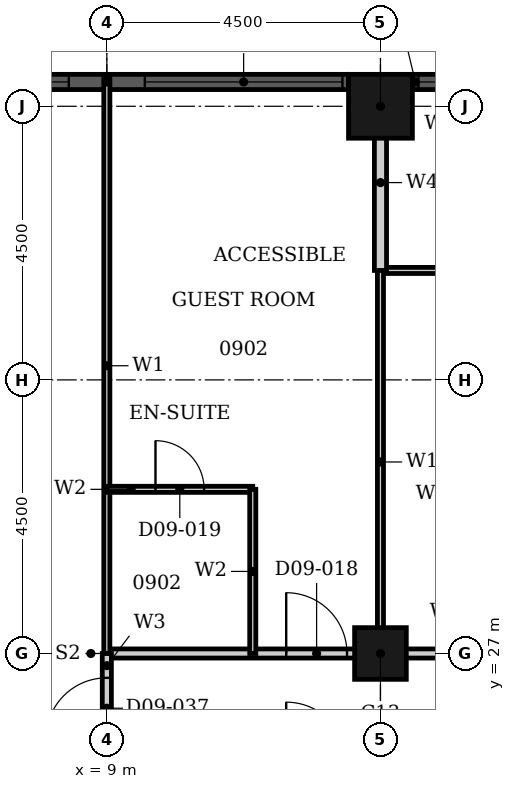
"""IFC4 building model, lengths in metres.
Left out: names, types, materials, properties, quantities, classifications, styles, units other than length and angle.
Written with IfcOpenShell. Run it as: python <this file> out.ifc"""

import sys

from ifc_helpers import new_model, si_unit, direction, frame, frame_2d, origin, origin_2d, place, context, subcontext, project, spatial, rectangle, hollow_rectangle, extrude, element, fill, save


model = new_model("IFC4")
c1 = context("Model", 3, precision=1e-05, world=origin(), true_north=direction((0.0, 1.0)))
c2 = subcontext(c1, "Body", "Model", "MODEL_VIEW")
j1 = project(units=[si_unit("LENGTHUNIT", "METRE"), si_unit("PLANEANGLEUNIT", "RADIAN")], contexts=[c1])
p1 = place(None, origin())
s1 = spatial("IfcSite", under=j1, at=p1, CompositionType="ELEMENT")
p2 = place(p1, origin())
s2 = spatial("IfcBuilding", under=s1, at=p2, CompositionType="ELEMENT")
p3 = place(p2, frame((0.0, 0.0, 44.4)))
s3 = spatial("IfcBuildingStorey", under=s2, at=p3, CompositionType="ELEMENT", Elevation=44.4)
p4 = place(p3, frame((13.5, 36.0, 0.0), z_axis=(0.0, 0.0, 1.0), x_axis=(1.0, 0.0, 0.0)))
e1 = element("IfcColumn", 1, at=p4, inside=s3, PredefinedType="COLUMN", context=c2, shape_type="SweptSolid", body=[
    extrude(hollow_rectangle(XDim=1.05, YDim=1.05, WallThickness=0.034, at=origin_2d()), origin(), (0.0, 0.0, 1.0), 3.6),
])
p5 = place(p3, frame((13.5, 27.0, 0.0), z_axis=(0.0, 0.0, 1.0), x_axis=(1.0, 0.0, 0.0)))
e2 = element("IfcColumn", 2, at=p5, inside=s3, PredefinedType="COLUMN", context=c2, shape_type="SweptSolid", body=[
    extrude(hollow_rectangle(XDim=0.85, YDim=0.85, WallThickness=0.026, at=origin_2d()), origin(), (0.0, 0.0, 1.0), 3.6),
])
p6 = place(p3, frame((15.225, 36.4, 0.0), z_axis=(0.0, 0.0, 1.0), x_axis=(-1.0, 0.0, 0.0)))
e3 = element("IfcWall", 3, at=p6, inside=s3, PredefinedType="SOLIDWALL", context=c2, shape_type="SweptSolid", body=[
    extrude(rectangle(XDim=1.2, YDim=0.25, at=frame_2d((0.6, 0.0))), origin(), (0.0, 0.0, 1.0), 3.6),
])
p7 = place(p6, frame((0.1, 0.0, 0.9)))
e4 = element("IfcOpeningElement", 4, at=p7, cuts=e3, PredefinedType="OPENING", context=c2, shape_type="SweptSolid", body=[
    extrude(rectangle(XDim=1.0, YDim=2.08, at=frame_2d((0.5, 1.04))), frame((0.0, 0.135, 0.0), z_axis=(0.0, -1.0, 0.0), x_axis=(1.0, 0.0, 0.0)), (0.0, 0.0, 1.0), 0.27),
])
p8 = place(p3, frame((12.975, 36.4, 0.0), z_axis=(0.0, 0.0, 1.0), x_axis=(-1.0, 0.0, 0.0)))
e5 = element("IfcWall", 5, at=p8, inside=s3, PredefinedType="SOLIDWALL", context=c2, shape_type="SweptSolid", body=[
    extrude(rectangle(XDim=7.95, YDim=0.25, at=frame_2d((3.975, 0.0))), origin(), (0.0, 0.0, 1.0), 3.6),
])
p9 = place(p8, frame((0.1, 0.0, 0.9)))
e6 = element("IfcOpeningElement", 6, at=p9, cuts=e5, PredefinedType="OPENING", context=c2, shape_type="SweptSolid", body=[
    extrude(rectangle(XDim=3.25, YDim=2.08, at=frame_2d((1.625, 1.04))), frame((0.0, 0.135, 0.0), z_axis=(0.0, -1.0, 0.0), x_axis=(1.0, 0.0, 0.0)), (0.0, 0.0, 1.0), 0.27),
])
p10 = place(p8, frame((4.6, 0.0, 0.9)))
e7 = element("IfcOpeningElement", 7, at=p10, cuts=e5, PredefinedType="OPENING", context=c2, shape_type="SweptSolid", body=[
    extrude(rectangle(XDim=3.25, YDim=2.08, at=frame_2d((1.625, 1.04))), frame((0.0, 0.135, 0.0), z_axis=(0.0, -1.0, 0.0), x_axis=(1.0, 0.0, 0.0)), (0.0, 0.0, 1.0), 0.27),
])
p11 = place(p3, frame((9.0, 27.0, 0.0), z_axis=(0.0, 0.0, 1.0), x_axis=(1.0, 0.0, 0.0)))
e8 = element("IfcWall", 8, at=p11, inside=s3, PredefinedType="PARTITIONING", context=c2, shape_type="SweptSolid", body=[
    extrude(rectangle(XDim=7.2, YDim=0.15, at=frame_2d((3.6, 0.0))), origin(), (0.0, 0.0, 1.0), 2.48),
])
p12 = place(p11, frame((2.95, 0.0, 0.0)))
e9 = element("IfcOpeningElement", 9, at=p12, cuts=e8, PredefinedType="OPENING", context=c2, shape_type="SweptSolid", body=[
    extrude(rectangle(XDim=1.0, YDim=2.1, at=frame_2d((0.5, 1.05))), frame((0.0, 0.085, 0.0), z_axis=(0.0, -1.0, 0.0), x_axis=(1.0, 0.0, 0.0)), (0.0, 0.0, 1.0), 0.17),
])
p13 = place(p3, frame((9.0, 25.2, 0.0), z_axis=(0.0, 0.0, 1.0), x_axis=(0.0, 1.0, 0.0)))
e10 = element("IfcWall", 10, at=p13, inside=s3, PredefinedType="PARTITIONING", context=c2, shape_type="SweptSolid", body=[
    extrude(rectangle(XDim=1.8, YDim=0.15, at=frame_2d((0.9, 0.0))), origin(), (0.0, 0.0, 1.0), 3.2),
])
p14 = place(p13, frame((0.4, 0.0, 0.0)))
e11 = element("IfcOpeningElement", 11, at=p14, cuts=e10, PredefinedType="OPENING", context=c2, shape_type="SweptSolid", body=[
    extrude(rectangle(XDim=1.0, YDim=2.1, at=frame_2d((0.5, 1.05))), frame((0.0, 0.085, 0.0), z_axis=(0.0, -1.0, 0.0), x_axis=(1.0, 0.0, 0.0)), (0.0, 0.0, 1.0), 0.17),
])
p15 = place(p3, frame((13.5, 33.3, 0.0), z_axis=(0.0, 0.0, 1.0), x_axis=(1.0, 0.0, 0.0)))
e12 = element("IfcWall", 12, at=p15, inside=s3, PredefinedType="PARTITIONING", context=c2, shape_type="SweptSolid", body=[
    extrude(rectangle(XDim=2.7, YDim=0.1, at=frame_2d((1.35, 0.0))), origin(), (0.0, 0.0, 1.0), 3.2),
])
p16 = place(p3, frame((13.5, 27.0, 0.0), z_axis=(0.0, 0.0, 1.0), x_axis=(0.0, 1.0, 0.0)))
e13 = element("IfcWall", 13, at=p16, inside=s3, PredefinedType="PARTITIONING", context=c2, shape_type="SweptSolid", body=[
    extrude(rectangle(XDim=6.3, YDim=0.1, at=frame_2d((3.15, 0.0))), origin(), (0.0, 0.0, 1.0), 2.28),
])
p17 = place(p3, frame((9.0, 27.0, 0.0), z_axis=(0.0, 0.0, 1.0), x_axis=(0.0, 1.0, 0.0)))
e14 = element("IfcWall", 14, at=p17, inside=s3, PredefinedType="PARTITIONING", context=c2, shape_type="SweptSolid", body=[
    extrude(rectangle(XDim=9.465, YDim=0.1, at=frame_2d((4.732, 0.0))), origin(), (0.0, 0.0, 1.0), 3.2),
])
p18 = place(p3, frame((13.5, 33.3, 0.0), z_axis=(0.0, 0.0, 1.0), x_axis=(0.0, 1.0, 0.0)))
e15 = element("IfcWall", 15, at=p18, inside=s3, PredefinedType="PARTITIONING", context=c2, shape_type="SweptSolid", body=[
    extrude(rectangle(XDim=2.89, YDim=0.2, at=frame_2d((1.445, 0.0))), origin(), (0.0, 0.0, 1.0), 2.28),
])
p19 = place(p3, frame((9.0, 29.7, 0.0), z_axis=(0.0, 0.0, 1.0), x_axis=(1.0, 0.0, 0.0)))
e16 = element("IfcWall", 16, at=p19, inside=s3, PredefinedType="PARTITIONING", context=c2, shape_type="SweptSolid", body=[
    extrude(rectangle(XDim=2.4, YDim=0.1, at=frame_2d((1.2, 0.0))), origin(), (0.0, 0.0, 1.0), 3.2),
])
p20 = place(p19, frame((0.8, 0.0, 0.0)))
e17 = element("IfcOpeningElement", 17, at=p20, cuts=e16, PredefinedType="OPENING", context=c2, shape_type="SweptSolid", body=[
    extrude(rectangle(XDim=0.8, YDim=2.1, at=frame_2d((0.4, 1.05))), frame((0.0, 0.06, 0.0), z_axis=(0.0, -1.0, 0.0), x_axis=(1.0, 0.0, 0.0)), (0.0, 0.0, 1.0), 0.12),
])
p21 = place(p3, frame((11.4, 27.0, 0.0), z_axis=(0.0, 0.0, 1.0), x_axis=(0.0, 1.0, 0.0)))
e18 = element("IfcWall", 18, at=p21, inside=s3, PredefinedType="PARTITIONING", context=c2, shape_type="SweptSolid", body=[
    extrude(rectangle(XDim=2.7, YDim=0.1, at=frame_2d((1.35, 0.0))), origin(), (0.0, 0.0, 1.0), 3.2),
])
p22 = place(p7, origin())
e19 = element("IfcWindow", 19, at=p22, inside=s3, PartitioningType="SINGLE_PANEL", PredefinedType="WINDOW", context=c2, shape_type="SweptSolid", body=[
    extrude(rectangle(XDim=1.0, YDim=2.08, at=frame_2d((0.5, 1.04))), frame((0.0, 0.03, 0.0), z_axis=(0.0, -1.0, 0.0), x_axis=(1.0, 0.0, 0.0)), (0.0, 0.0, 1.0), 0.06),
])
fill(e4, e19)
p23 = place(p9, origin())
e20 = element("IfcWindow", 20, at=p23, inside=s3, PartitioningType="SINGLE_PANEL", PredefinedType="WINDOW", context=c2, shape_type="SweptSolid", body=[
    extrude(rectangle(XDim=3.25, YDim=2.08, at=frame_2d((1.625, 1.04))), frame((0.0, 0.03, 0.0), z_axis=(0.0, -1.0, 0.0), x_axis=(1.0, 0.0, 0.0)), (0.0, 0.0, 1.0), 0.06),
])
fill(e6, e20)
p24 = place(p10, origin())
e21 = element("IfcWindow", 21, at=p24, inside=s3, PartitioningType="SINGLE_PANEL", PredefinedType="WINDOW", context=c2, shape_type="SweptSolid", body=[
    extrude(rectangle(XDim=3.25, YDim=2.08, at=frame_2d((1.625, 1.04))), frame((0.0, 0.03, 0.0), z_axis=(0.0, -1.0, 0.0), x_axis=(1.0, 0.0, 0.0)), (0.0, 0.0, 1.0), 0.06),
])
fill(e7, e21)
p25 = place(p12, origin())
e22 = element("IfcDoor", 22, at=p25, inside=s3, OperationType="SINGLE_SWING_RIGHT", PredefinedType="DOOR", context=c2, shape_type="SweptSolid", body=[
    extrude(rectangle(XDim=1.0, YDim=2.1, at=frame_2d((0.5, 1.05))), frame((0.0, 0.025, 0.0), z_axis=(0.0, -1.0, 0.0), x_axis=(1.0, 0.0, 0.0)), (0.0, 0.0, 1.0), 0.05),
])
fill(e9, e22)
p26 = place(p20, origin())
e23 = element("IfcDoor", 23, at=p26, inside=s3, OperationType="SINGLE_SWING_RIGHT", PredefinedType="DOOR", context=c2, shape_type="SweptSolid", body=[
    extrude(rectangle(XDim=0.8, YDim=2.1, at=frame_2d((0.4, 1.05))), frame((0.0, 0.025, 0.0), z_axis=(0.0, -1.0, 0.0), x_axis=(1.0, 0.0, 0.0)), (0.0, 0.0, 1.0), 0.05),
])
fill(e17, e23)
p27 = place(p14, origin())
e24 = element("IfcDoor", 24, at=p27, inside=s3, OperationType="SINGLE_SWING_LEFT", PredefinedType="DOOR", context=c2, shape_type="SweptSolid", body=[
    extrude(rectangle(XDim=1.0, YDim=2.1, at=frame_2d((0.5, 1.05))), frame((0.0, 0.025, 0.0), z_axis=(0.0, -1.0, 0.0), x_axis=(1.0, 0.0, 0.0)), (0.0, 0.0, 1.0), 0.05),
])
fill(e11, e24)
save(model, sys.argv[1])
